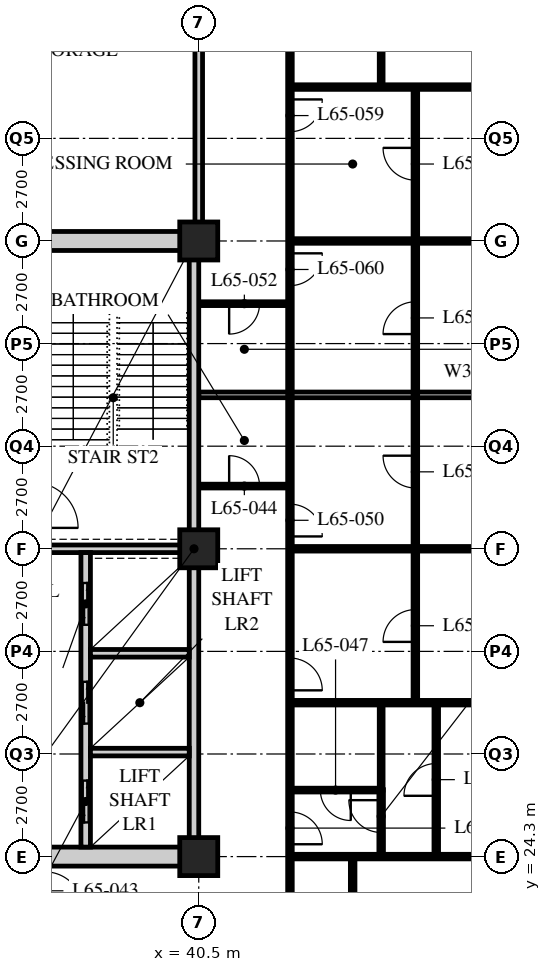
"""IFC4 building model, lengths in metres.
Left out: names, types, materials, properties, quantities, classifications, styles, units other than length and angle.
Written with IfcOpenShell. Run it as: python <this file> out.ifc"""

import sys

from ifc_helpers import new_model, si_unit, direction, frame, frame_2d, origin, origin_2d, place, context, subcontext, project, spatial, rectangle, hollow_rectangle, extrude, element, fill, save


model = new_model("IFC4")
c1 = context("Model", 3, precision=1e-05, world=origin(), true_north=direction((0.0, 1.0)))
c2 = subcontext(c1, "Body", "Model", "MODEL_VIEW")
j1 = project(units=[si_unit("LENGTHUNIT", "METRE"), si_unit("PLANEANGLEUNIT", "RADIAN")], contexts=[c1])
p1 = place(None, origin())
s1 = spatial("IfcSite", under=j1, at=p1, CompositionType="ELEMENT")
p2 = place(p1, origin())
s2 = spatial("IfcBuilding", under=s1, at=p2, CompositionType="ELEMENT")
p3 = place(p2, frame((0.0, 0.0, 254.1)))
s3 = spatial("IfcBuildingStorey", under=s2, at=p3, CompositionType="ELEMENT", Elevation=254.1)
for number, where, z_axis, x_axis in (
    (1, (40.5, 24.3, 0.0), (0.0, 0.0, 1.0), (1.0, 0.0, 0.0)),
    (2, (40.5, 32.4, 0.0), (0.0, 0.0, 1.0), (1.0, 0.0, 0.0)),
    (3, (40.5, 40.5, 0.0), (0.0, 0.0, 1.0), (1.0, 0.0, 0.0)),
):
    element("IfcColumn", number, at=place(p3, frame(where, z_axis=z_axis, x_axis=x_axis)), inside=s3, PredefinedType="COLUMN", context=c2, shape_type="SweptSolid", body=[
        extrude(hollow_rectangle(XDim=1.0, YDim=1.0, WallThickness=0.1, at=origin_2d()), origin(), (0.0, 0.0, 1.0), 3.9),
    ])
p4 = place(p3, frame((40.5, 40.5, 0.0), z_axis=(0.0, 0.0, 1.0), x_axis=(0.0, 1.0, 0.0)))
e4 = element("IfcWall", 4, at=p4, inside=s3, PredefinedType="SOLIDWALL", context=c2, shape_type="SweptSolid", body=[
    extrude(rectangle(XDim=10.35, YDim=0.2, at=frame_2d((5.175, 0.0))), origin(), (0.0, 0.0, 1.0), 3.078),
])
p5 = place(p3, frame((40.5, 34.05, 0.0), z_axis=(0.0, 0.0, 1.0), x_axis=(1.0, 0.0, 0.0)))
e5 = element("IfcWall", 5, at=p5, inside=s3, PredefinedType="PARTITIONING", context=c2, shape_type="SweptSolid", body=[
    extrude(rectangle(XDim=2.4, YDim=0.1, at=frame_2d((1.2, 0.0))), origin(), (0.0, 0.0, 1.0), 3.69),
])
p6 = place(p5, frame((0.8, 0.0, 0.0)))
e6 = element("IfcOpeningElement", 6, at=p6, cuts=e5, PredefinedType="OPENING", context=c2, shape_type="SweptSolid", body=[
    extrude(rectangle(XDim=0.8, YDim=2.1, at=frame_2d((0.4, 1.05))), frame((0.0, 0.06, 0.0), z_axis=(0.0, -1.0, 0.0), x_axis=(1.0, 0.0, 0.0)), (0.0, 0.0, 1.0), 0.12),
])
p7 = place(p3, frame((42.9, 22.5, 0.0), z_axis=(0.0, 0.0, 1.0), x_axis=(0.0, 1.0, 0.0)))
e7 = element("IfcWall", 7, at=p7, inside=s3, PredefinedType="PARTITIONING", context=c2, shape_type="SweptSolid", body=[
    extrude(rectangle(XDim=13.95, YDim=0.12, at=frame_2d((6.975, 0.0))), origin(), (0.0, 0.0, 1.0), 3.69),
])
p8 = place(p7, frame((2.125, 0.0, 0.0)))
e8 = element("IfcOpeningElement", 8, at=p8, cuts=e7, PredefinedType="OPENING", context=c2, shape_type="SweptSolid", body=[
    extrude(rectangle(XDim=0.85, YDim=2.1, at=frame_2d((0.425, 1.05))), frame((0.0, 0.07, 0.0), z_axis=(0.0, -1.0, 0.0), x_axis=(1.0, 0.0, 0.0)), (0.0, 0.0, 1.0), 0.14),
])
p9 = place(p7, frame((6.175, 0.0, 0.0)))
e9 = element("IfcOpeningElement", 9, at=p9, cuts=e7, PredefinedType="OPENING", context=c2, shape_type="SweptSolid", body=[
    extrude(rectangle(XDim=0.85, YDim=2.1, at=frame_2d((0.425, 1.05))), frame((0.0, 0.07, 0.0), z_axis=(0.0, -1.0, 0.0), x_axis=(1.0, 0.0, 0.0)), (0.0, 0.0, 1.0), 0.14),
])
p10 = place(p7, frame((10.225, 0.0, 0.0)))
e10 = element("IfcOpeningElement", 10, at=p10, cuts=e7, PredefinedType="OPENING", context=c2, shape_type="SweptSolid", body=[
    extrude(rectangle(XDim=0.85, YDim=2.1, at=frame_2d((0.425, 1.05))), frame((0.0, 0.07, 0.0), z_axis=(0.0, -1.0, 0.0), x_axis=(1.0, 0.0, 0.0)), (0.0, 0.0, 1.0), 0.14),
])
p11 = place(p3, frame((42.9, 24.3, 0.0), z_axis=(0.0, 0.0, 1.0), x_axis=(1.0, 0.0, 0.0)))
e11 = element("IfcWall", 11, at=p11, inside=s3, PredefinedType="PARTITIONING", context=c2, shape_type="SweptSolid", body=[
    extrude(rectangle(XDim=9.45, YDim=0.12, at=frame_2d((4.725, 0.0))), origin(), (0.0, 0.0, 1.0), 3.078),
])
p12 = place(p3, frame((40.5, 36.45, 0.0), z_axis=(0.0, 0.0, 1.0), x_axis=(1.0, 0.0, 0.0)))
e12 = element("IfcWall", 12, at=p12, inside=s3, PredefinedType="PARTITIONING", context=c2, shape_type="SweptSolid", body=[
    extrude(rectangle(XDim=15.9, YDim=0.15, at=frame_2d((7.95, 0.0))), origin(), (0.0, 0.0, 1.0), 3.69),
])
p13 = place(p3, frame((44.55, 16.5, 0.0), z_axis=(0.0, 0.0, 1.0), x_axis=(0.0, 1.0, 0.0)))
e13 = element("IfcWall", 13, at=p13, inside=s3, PredefinedType="PARTITIONING", context=c2, shape_type="SweptSolid", body=[
    extrude(rectangle(XDim=7.8, YDim=0.12, at=frame_2d((3.9, 0.0))), origin(), (0.0, 0.0, 1.0), 3.69),
])
p14 = place(p13, frame((3.475, 0.0, 0.0)))
e14 = element("IfcOpeningElement", 14, at=p14, cuts=e13, PredefinedType="OPENING", context=c2, shape_type="SweptSolid", body=[
    extrude(rectangle(XDim=0.85, YDim=2.1, at=frame_2d((0.425, 1.05))), frame((0.0, 0.07, 0.0), z_axis=(0.0, -1.0, 0.0), x_axis=(1.0, 0.0, 0.0)), (0.0, 0.0, 1.0), 0.14),
])
p15 = place(p3, frame((42.9, 26.05, 0.0), z_axis=(0.0, 0.0, 1.0), x_axis=(1.0, 0.0, 0.0)))
e15 = element("IfcWall", 15, at=p15, inside=s3, PredefinedType="PARTITIONING", context=c2, shape_type="SweptSolid", body=[
    extrude(rectangle(XDim=2.4, YDim=0.1, at=frame_2d((1.2, 0.0))), origin(), (0.0, 0.0, 1.0), 3.69),
])
p16 = place(p15, frame((0.8, 0.0, 0.0)))
e16 = element("IfcOpeningElement", 16, at=p16, cuts=e15, PredefinedType="OPENING", context=c2, shape_type="SweptSolid", body=[
    extrude(rectangle(XDim=0.8, YDim=2.1, at=frame_2d((0.4, 1.05))), frame((0.0, 0.06, 0.0), z_axis=(0.0, -1.0, 0.0), x_axis=(1.0, 0.0, 0.0)), (0.0, 0.0, 1.0), 0.12),
])
p17 = place(p3, frame((45.3, 26.05, 0.0), z_axis=(0.0, 0.0, 1.0), x_axis=(0.0, 1.0, 0.0)))
e17 = element("IfcWall", 17, at=p17, inside=s3, PredefinedType="PARTITIONING", context=c2, shape_type="SweptSolid", body=[
    extrude(rectangle(XDim=2.3, YDim=0.1, at=frame_2d((1.15, 0.0))), origin(), (0.0, 0.0, 1.0), 3.69),
])
p18 = place(p3, frame((42.9, 28.35, 0.0), z_axis=(0.0, 0.0, 1.0), x_axis=(1.0, 0.0, 0.0)))
e18 = element("IfcWall", 18, at=p18, inside=s3, PredefinedType="PARTITIONING", context=c2, shape_type="SweptSolid", body=[
    extrude(rectangle(XDim=13.5, YDim=0.12, at=frame_2d((6.75, 0.0))), origin(), (0.0, 0.0, 1.0), 3.69),
])
p19 = place(p3, frame((42.9, 32.4, 0.0), z_axis=(0.0, 0.0, 1.0), x_axis=(1.0, 0.0, 0.0)))
e19 = element("IfcWall", 19, at=p19, inside=s3, PredefinedType="PARTITIONING", context=c2, shape_type="SweptSolid", body=[
    extrude(rectangle(XDim=13.5, YDim=0.12, at=frame_2d((6.75, 0.0))), origin(), (0.0, 0.0, 1.0), 3.078),
])
p20 = place(p3, frame((40.5, 38.85, 0.0), z_axis=(0.0, 0.0, 1.0), x_axis=(1.0, 0.0, 0.0)))
e20 = element("IfcWall", 20, at=p20, inside=s3, PredefinedType="PARTITIONING", context=c2, shape_type="SweptSolid", body=[
    extrude(rectangle(XDim=2.4, YDim=0.1, at=frame_2d((1.2, 0.0))), origin(), (0.0, 0.0, 1.0), 3.69),
])
p21 = place(p20, frame((0.8, 0.0, 0.0)))
e21 = element("IfcOpeningElement", 21, at=p21, cuts=e20, PredefinedType="OPENING", context=c2, shape_type="SweptSolid", body=[
    extrude(rectangle(XDim=0.8, YDim=2.1, at=frame_2d((0.4, 1.05))), frame((0.0, 0.06, 0.0), z_axis=(0.0, -1.0, 0.0), x_axis=(1.0, 0.0, 0.0)), (0.0, 0.0, 1.0), 0.12),
])
p22 = place(p3, frame((42.9, 52.65, 0.0), z_axis=(0.0, 0.0, 1.0), x_axis=(0.0, -1.0, 0.0)))
e22 = element("IfcWall", 22, at=p22, inside=s3, PredefinedType="PARTITIONING", context=c2, shape_type="SweptSolid", body=[
    extrude(rectangle(XDim=16.2, YDim=0.12, at=frame_2d((8.1, 0.0))), origin(), (0.0, 0.0, 1.0), 3.69),
])
p23 = place(p22, frame((2.125, 0.0, 0.0)))
e23 = element("IfcOpeningElement", 23, at=p23, cuts=e22, PredefinedType="OPENING", context=c2, shape_type="SweptSolid", body=[
    extrude(rectangle(XDim=0.85, YDim=2.1, at=frame_2d((0.425, 1.05))), frame((0.0, 0.07, 0.0), z_axis=(0.0, -1.0, 0.0), x_axis=(1.0, 0.0, 0.0)), (0.0, 0.0, 1.0), 0.14),
])
p24 = place(p22, frame((8.425, 0.0, 0.0)))
e24 = element("IfcOpeningElement", 24, at=p24, cuts=e22, PredefinedType="OPENING", context=c2, shape_type="SweptSolid", body=[
    extrude(rectangle(XDim=0.85, YDim=2.1, at=frame_2d((0.425, 1.05))), frame((0.0, 0.07, 0.0), z_axis=(0.0, -1.0, 0.0), x_axis=(1.0, 0.0, 0.0)), (0.0, 0.0, 1.0), 0.14),
])
p25 = place(p22, frame((12.475, 0.0, 0.0)))
e25 = element("IfcOpeningElement", 25, at=p25, cuts=e22, PredefinedType="OPENING", context=c2, shape_type="SweptSolid", body=[
    extrude(rectangle(XDim=0.85, YDim=2.1, at=frame_2d((0.425, 1.05))), frame((0.0, 0.07, 0.0), z_axis=(0.0, -1.0, 0.0), x_axis=(1.0, 0.0, 0.0)), (0.0, 0.0, 1.0), 0.14),
])
p26 = place(p3, frame((45.3, 46.85, 0.0), z_axis=(0.0, 0.0, 1.0), x_axis=(0.0, -1.0, 0.0)))
e26 = element("IfcWall", 26, at=p26, inside=s3, PredefinedType="PARTITIONING", context=c2, shape_type="SweptSolid", body=[
    extrude(rectangle(XDim=2.3, YDim=0.1, at=frame_2d((1.15, 0.0))), origin(), (0.0, 0.0, 1.0), 3.69),
])
p27 = place(p3, frame((42.9, 44.55, 0.0), z_axis=(0.0, 0.0, 1.0), x_axis=(1.0, 0.0, 0.0)))
e27 = element("IfcWall", 27, at=p27, inside=s3, PredefinedType="PARTITIONING", context=c2, shape_type="SweptSolid", body=[
    extrude(rectangle(XDim=13.5, YDim=0.12, at=frame_2d((6.75, 0.0))), origin(), (0.0, 0.0, 1.0), 3.69),
])
p28 = place(p3, frame((42.9, 40.5, 0.0), z_axis=(0.0, 0.0, 1.0), x_axis=(1.0, 0.0, 0.0)))
e28 = element("IfcWall", 28, at=p28, inside=s3, PredefinedType="PARTITIONING", context=c2, shape_type="SweptSolid", body=[
    extrude(rectangle(XDim=13.5, YDim=0.12, at=frame_2d((6.75, 0.0))), origin(), (0.0, 0.0, 1.0), 3.078),
])
p29 = place(p3, frame((45.3, 24.3, 0.0), z_axis=(0.0, 0.0, 1.0), x_axis=(0.0, 1.0, 0.0)))
e29 = element("IfcWall", 29, at=p29, inside=s3, PredefinedType="PARTITIONING", context=c2, shape_type="SweptSolid", body=[
    extrude(rectangle(XDim=1.76, YDim=0.12, at=frame_2d((0.88, 0.0))), origin(), (0.0, 0.0, 1.0), 3.69),
])
p30 = place(p29, frame((0.635, 0.0, 0.0)))
e30 = element("IfcOpeningElement", 30, at=p30, cuts=e29, PredefinedType="OPENING", context=c2, shape_type="SweptSolid", body=[
    extrude(rectangle(XDim=0.85, YDim=2.1, at=frame_2d((0.425, 1.05))), frame((0.0, 0.07, 0.0), z_axis=(0.0, -1.0, 0.0), x_axis=(1.0, 0.0, 0.0)), (0.0, 0.0, 1.0), 0.14),
])
p31 = place(p3, frame((46.75, 24.3, 0.0), z_axis=(0.0, 0.0, 1.0), x_axis=(0.0, 1.0, 0.0)))
e31 = element("IfcWall", 31, at=p31, inside=s3, PredefinedType="PARTITIONING", context=c2, shape_type="SweptSolid", body=[
    extrude(rectangle(XDim=4.05, YDim=0.12, at=frame_2d((2.025, 0.0))), origin(), (0.0, 0.0, 1.0), 3.69),
])
p32 = place(p31, frame((1.6, 0.0, 0.0)))
e32 = element("IfcOpeningElement", 32, at=p32, cuts=e31, PredefinedType="OPENING", context=c2, shape_type="SweptSolid", body=[
    extrude(rectangle(XDim=0.85, YDim=2.1, at=frame_2d((0.425, 1.05))), frame((0.0, 0.07, 0.0), z_axis=(0.0, -1.0, 0.0), x_axis=(1.0, 0.0, 0.0)), (0.0, 0.0, 1.0), 0.14),
])
p33 = place(p3, frame((46.2, 28.35, 0.0), z_axis=(0.0, 0.0, 1.0), x_axis=(0.0, 1.0, 0.0)))
e33 = element("IfcWall", 33, at=p33, inside=s3, PredefinedType="PARTITIONING", context=c2, shape_type="SweptSolid", body=[
    extrude(rectangle(XDim=16.2, YDim=0.12, at=frame_2d((8.1, 0.0))), origin(), (0.0, 0.0, 1.0), 3.69),
])
p34 = place(p33, frame((1.6, 0.0, 0.0)))
e34 = element("IfcOpeningElement", 34, at=p34, cuts=e33, PredefinedType="OPENING", context=c2, shape_type="SweptSolid", body=[
    extrude(rectangle(XDim=0.85, YDim=2.1, at=frame_2d((0.425, 1.05))), frame((0.0, 0.07, 0.0), z_axis=(0.0, -1.0, 0.0), x_axis=(1.0, 0.0, 0.0)), (0.0, 0.0, 1.0), 0.14),
])
p35 = place(p33, frame((5.65, 0.0, 0.0)))
e35 = element("IfcOpeningElement", 35, at=p35, cuts=e33, PredefinedType="OPENING", context=c2, shape_type="SweptSolid", body=[
    extrude(rectangle(XDim=0.85, YDim=2.1, at=frame_2d((0.425, 1.05))), frame((0.0, 0.07, 0.0), z_axis=(0.0, -1.0, 0.0), x_axis=(1.0, 0.0, 0.0)), (0.0, 0.0, 1.0), 0.14),
])
p36 = place(p33, frame((13.75, 0.0, 0.0)))
e36 = element("IfcOpeningElement", 36, at=p36, cuts=e33, PredefinedType="OPENING", context=c2, shape_type="SweptSolid", body=[
    extrude(rectangle(XDim=0.85, YDim=2.1, at=frame_2d((0.425, 1.05))), frame((0.0, 0.07, 0.0), z_axis=(0.0, -1.0, 0.0), x_axis=(1.0, 0.0, 0.0)), (0.0, 0.0, 1.0), 0.14),
])
p37 = place(p33, frame((9.7, 0.0, 0.0)))
e37 = element("IfcOpeningElement", 37, at=p37, cuts=e33, PredefinedType="OPENING", context=c2, shape_type="SweptSolid", body=[
    extrude(rectangle(XDim=0.85, YDim=2.1, at=frame_2d((0.425, 1.05))), frame((0.0, 0.07, 0.0), z_axis=(0.0, -1.0, 0.0), x_axis=(1.0, 0.0, 0.0)), (0.0, 0.0, 1.0), 0.14),
])
p38 = place(p3, frame((15.95, 24.3, 0.0), z_axis=(0.0, 0.0, 1.0), x_axis=(1.0, 0.0, 0.0)))
e38 = element("IfcWall", 38, at=p38, inside=s3, PredefinedType="SOLIDWALL", context=c2, shape_type="SweptSolid", body=[
    extrude(rectangle(XDim=24.55, YDim=0.5, at=frame_2d((12.275, 0.0))), origin(), (0.0, 0.0, 1.0), 3.04),
])
p39 = place(p38, frame((11.5, 0.0, 0.0)))
e39 = element("IfcOpeningElement", 39, at=p39, cuts=e38, PredefinedType="OPENING", context=c2, shape_type="SweptSolid", body=[
    extrude(rectangle(XDim=1.8, YDim=2.4, at=frame_2d((0.9, 1.2))), frame((0.0, 0.26, 0.0), z_axis=(0.0, -1.0, 0.0), x_axis=(1.0, 0.0, 0.0)), (0.0, 0.0, 1.0), 0.52),
])
p40 = place(p3, frame((15.95, 40.5, 0.0), z_axis=(0.0, 0.0, 1.0), x_axis=(1.0, 0.0, 0.0)))
e40 = element("IfcWall", 40, at=p40, inside=s3, PredefinedType="SOLIDWALL", context=c2, shape_type="SweptSolid", body=[
    extrude(rectangle(XDim=24.55, YDim=0.5, at=frame_2d((12.275, 0.0))), origin(), (0.0, 0.0, 1.0), 3.04),
])
p41 = place(p40, frame((11.5, 0.0, 0.0)))
e41 = element("IfcOpeningElement", 41, at=p41, cuts=e40, PredefinedType="OPENING", context=c2, shape_type="SweptSolid", body=[
    extrude(rectangle(XDim=1.8, YDim=2.4, at=frame_2d((0.9, 1.2))), frame((0.0, 0.26, 0.0), z_axis=(0.0, -1.0, 0.0), x_axis=(1.0, 0.0, 0.0)), (0.0, 0.0, 1.0), 0.52),
])
p42 = place(p3, frame((40.375, 24.55, 0.0), z_axis=(0.0, 0.0, 1.0), x_axis=(0.0, 1.0, 0.0)))
e42 = element("IfcWall", 42, at=p42, inside=s3, PredefinedType="SOLIDWALL", context=c2, shape_type="SweptSolid", body=[
    extrude(rectangle(XDim=15.7, YDim=0.25, at=frame_2d((7.85, 0.0))), origin(), (0.0, 0.0, 1.0), 3.078),
])
p43 = place(p3, frame((32.3, 32.4, 0.0), z_axis=(0.0, 0.0, 1.0), x_axis=(1.0, 0.0, 0.0)))
e43 = element("IfcWall", 43, at=p43, inside=s3, PredefinedType="SOLIDWALL", context=c2, shape_type="SweptSolid", body=[
    extrude(rectangle(XDim=7.95, YDim=0.2, at=frame_2d((3.975, 0.0))), origin(), (0.0, 0.0, 1.0), 3.078),
])
p44 = place(p3, frame((37.525, 24.55, 0.0), z_axis=(0.0, 0.0, 1.0), x_axis=(0.0, 1.0, 0.0)))
e44 = element("IfcWall", 44, at=p44, inside=s3, PredefinedType="SOLIDWALL", context=c2, shape_type="SweptSolid", body=[
    extrude(rectangle(XDim=7.75, YDim=0.25, at=frame_2d((3.875, 0.0))), origin(), (0.0, 0.0, 1.0), 3.69),
])
p45 = place(p44, frame((0.65, 0.0, 0.0)))
e45 = element("IfcOpeningElement", 45, at=p45, cuts=e44, PredefinedType="OPENING", context=c2, shape_type="SweptSolid", body=[
    extrude(rectangle(XDim=1.1, YDim=2.4, at=frame_2d((0.55, 1.2))), frame((0.0, 0.135, 0.0), z_axis=(0.0, -1.0, 0.0), x_axis=(1.0, 0.0, 0.0)), (0.0, 0.0, 1.0), 0.27),
])
p46 = place(p44, frame((3.25, 0.0, 0.0)))
e46 = element("IfcOpeningElement", 46, at=p46, cuts=e44, PredefinedType="OPENING", context=c2, shape_type="SweptSolid", body=[
    extrude(rectangle(XDim=1.1, YDim=2.4, at=frame_2d((0.55, 1.2))), frame((0.0, 0.135, 0.0), z_axis=(0.0, -1.0, 0.0), x_axis=(1.0, 0.0, 0.0)), (0.0, 0.0, 1.0), 0.27),
])
p47 = place(p44, frame((5.85, 0.0, 0.0)))
e47 = element("IfcOpeningElement", 47, at=p47, cuts=e44, PredefinedType="OPENING", context=c2, shape_type="SweptSolid", body=[
    extrude(rectangle(XDim=1.1, YDim=2.4, at=frame_2d((0.55, 1.2))), frame((0.0, 0.135, 0.0), z_axis=(0.0, -1.0, 0.0), x_axis=(1.0, 0.0, 0.0)), (0.0, 0.0, 1.0), 0.27),
])
for number, where, z_axis, x_axis in (
    (48, (37.65, 27.05, 0.0), (0.0, 0.0, 1.0), (1.0, 0.0, 0.0)),
    (49, (37.65, 29.65, 0.0), (0.0, 0.0, 1.0), (1.0, 0.0, 0.0)),
):
    element("IfcWall", number, at=place(p3, frame(where, z_axis=z_axis, x_axis=x_axis)), inside=s3, PredefinedType="SOLIDWALL", context=c2, shape_type="SweptSolid", body=[
        extrude(rectangle(XDim=2.6, YDim=0.2, at=frame_2d((1.3, 0.0))), origin(), (0.0, 0.0, 1.0), 3.69),
    ])
p48 = place(p6, origin())
e50 = element("IfcDoor", 50, at=p48, inside=s3, OperationType="SINGLE_SWING_LEFT", PredefinedType="DOOR", context=c2, shape_type="SweptSolid", body=[
    extrude(rectangle(XDim=0.8, YDim=2.1, at=frame_2d((0.4, 1.05))), frame((0.0, 0.025, 0.0), z_axis=(0.0, -1.0, 0.0), x_axis=(1.0, 0.0, 0.0)), (0.0, 0.0, 1.0), 0.05),
])
fill(e6, e50)
p49 = place(p16, origin())
e51 = element("IfcDoor", 51, at=p49, inside=s3, OperationType="SINGLE_SWING_LEFT", PredefinedType="DOOR", context=c2, shape_type="SweptSolid", body=[
    extrude(rectangle(XDim=0.8, YDim=2.1, at=frame_2d((0.4, 1.05))), frame((0.0, 0.025, 0.0), z_axis=(0.0, -1.0, 0.0), x_axis=(1.0, 0.0, 0.0)), (0.0, 0.0, 1.0), 0.05),
])
fill(e16, e51)
p50 = place(p8, origin())
e52 = element("IfcDoor", 52, at=p50, inside=s3, OperationType="SINGLE_SWING_RIGHT", PredefinedType="DOOR", context=c2, shape_type="SweptSolid", body=[
    extrude(rectangle(XDim=0.85, YDim=2.1, at=frame_2d((0.425, 1.05))), frame((0.0, 0.025, 0.0), z_axis=(0.0, -1.0, 0.0), x_axis=(1.0, 0.0, 0.0)), (0.0, 0.0, 1.0), 0.05),
])
fill(e8, e52)
p51 = place(p9, origin())
e53 = element("IfcDoor", 53, at=p51, inside=s3, OperationType="SINGLE_SWING_RIGHT", PredefinedType="DOOR", context=c2, shape_type="SweptSolid", body=[
    extrude(rectangle(XDim=0.85, YDim=2.1, at=frame_2d((0.425, 1.05))), frame((0.0, 0.025, 0.0), z_axis=(0.0, -1.0, 0.0), x_axis=(1.0, 0.0, 0.0)), (0.0, 0.0, 1.0), 0.05),
])
fill(e9, e53)
p52 = place(p10, origin())
e54 = element("IfcDoor", 54, at=p52, inside=s3, OperationType="SINGLE_SWING_RIGHT", PredefinedType="DOOR", context=c2, shape_type="SweptSolid", body=[
    extrude(rectangle(XDim=0.85, YDim=2.1, at=frame_2d((0.425, 1.05))), frame((0.0, 0.025, 0.0), z_axis=(0.0, -1.0, 0.0), x_axis=(1.0, 0.0, 0.0)), (0.0, 0.0, 1.0), 0.05),
])
fill(e10, e54)
p53 = place(p21, origin())
e55 = element("IfcDoor", 55, at=p53, inside=s3, OperationType="SINGLE_SWING_RIGHT", PredefinedType="DOOR", context=c2, shape_type="SweptSolid", body=[
    extrude(rectangle(XDim=0.8, YDim=2.1, at=frame_2d((0.4, 1.05))), frame((0.0, 0.025, 0.0), z_axis=(0.0, -1.0, 0.0), x_axis=(1.0, 0.0, 0.0)), (0.0, 0.0, 1.0), 0.05),
])
fill(e21, e55)
p54 = place(p24, origin())
e56 = element("IfcDoor", 56, at=p54, inside=s3, OperationType="SINGLE_SWING_LEFT", PredefinedType="DOOR", context=c2, shape_type="SweptSolid", body=[
    extrude(rectangle(XDim=0.85, YDim=2.1, at=frame_2d((0.425, 1.05))), frame((0.0, 0.025, 0.0), z_axis=(0.0, -1.0, 0.0), x_axis=(1.0, 0.0, 0.0)), (0.0, 0.0, 1.0), 0.05),
])
fill(e24, e56)
p55 = place(p25, origin())
e57 = element("IfcDoor", 57, at=p55, inside=s3, OperationType="SINGLE_SWING_LEFT", PredefinedType="DOOR", context=c2, shape_type="SweptSolid", body=[
    extrude(rectangle(XDim=0.85, YDim=2.1, at=frame_2d((0.425, 1.05))), frame((0.0, 0.025, 0.0), z_axis=(0.0, -1.0, 0.0), x_axis=(1.0, 0.0, 0.0)), (0.0, 0.0, 1.0), 0.05),
])
fill(e25, e57)
p56 = place(p30, origin())
e58 = element("IfcDoor", 58, at=p56, inside=s3, OperationType="SINGLE_SWING_RIGHT", PredefinedType="DOOR", context=c2, shape_type="SweptSolid", body=[
    extrude(rectangle(XDim=0.85, YDim=2.1, at=frame_2d((0.425, 1.05))), frame((0.0, 0.025, 0.0), z_axis=(0.0, -1.0, 0.0), x_axis=(1.0, 0.0, 0.0)), (0.0, 0.0, 1.0), 0.05),
])
fill(e30, e58)
p57 = place(p32, origin())
e59 = element("IfcDoor", 59, at=p57, inside=s3, OperationType="SINGLE_SWING_LEFT", PredefinedType="DOOR", context=c2, shape_type="SweptSolid", body=[
    extrude(rectangle(XDim=0.85, YDim=2.1, at=frame_2d((0.425, 1.05))), frame((0.0, 0.025, 0.0), z_axis=(0.0, -1.0, 0.0), x_axis=(1.0, 0.0, 0.0)), (0.0, 0.0, 1.0), 0.05),
])
fill(e32, e59)
p58 = place(p34, origin())
e60 = element("IfcDoor", 60, at=p58, inside=s3, OperationType="SINGLE_SWING_LEFT", PredefinedType="DOOR", context=c2, shape_type="SweptSolid", body=[
    extrude(rectangle(XDim=0.85, YDim=2.1, at=frame_2d((0.425, 1.05))), frame((0.0, 0.025, 0.0), z_axis=(0.0, -1.0, 0.0), x_axis=(1.0, 0.0, 0.0)), (0.0, 0.0, 1.0), 0.05),
])
fill(e34, e60)
p59 = place(p35, origin())
e61 = element("IfcDoor", 61, at=p59, inside=s3, OperationType="SINGLE_SWING_RIGHT", PredefinedType="DOOR", context=c2, shape_type="SweptSolid", body=[
    extrude(rectangle(XDim=0.85, YDim=2.1, at=frame_2d((0.425, 1.05))), frame((0.0, 0.025, 0.0), z_axis=(0.0, -1.0, 0.0), x_axis=(1.0, 0.0, 0.0)), (0.0, 0.0, 1.0), 0.05),
])
fill(e35, e61)
p60 = place(p36, origin())
e62 = element("IfcDoor", 62, at=p60, inside=s3, OperationType="SINGLE_SWING_RIGHT", PredefinedType="DOOR", context=c2, shape_type="SweptSolid", body=[
    extrude(rectangle(XDim=0.85, YDim=2.1, at=frame_2d((0.425, 1.05))), frame((0.0, 0.025, 0.0), z_axis=(0.0, -1.0, 0.0), x_axis=(1.0, 0.0, 0.0)), (0.0, 0.0, 1.0), 0.05),
])
fill(e36, e62)
p61 = place(p37, origin())
e63 = element("IfcDoor", 63, at=p61, inside=s3, OperationType="SINGLE_SWING_LEFT", PredefinedType="DOOR", context=c2, shape_type="SweptSolid", body=[
    extrude(rectangle(XDim=0.85, YDim=2.1, at=frame_2d((0.425, 1.05))), frame((0.0, 0.025, 0.0), z_axis=(0.0, -1.0, 0.0), x_axis=(1.0, 0.0, 0.0)), (0.0, 0.0, 1.0), 0.05),
])
fill(e37, e63)
p62 = place(p45, origin())
e64 = element("IfcDoor", 64, at=p62, inside=s3, OperationType="DOUBLE_DOOR_SLIDING", PredefinedType="DOOR", context=c2, shape_type="SweptSolid", body=[
    extrude(rectangle(XDim=1.1, YDim=2.4, at=frame_2d((0.55, 1.2))), frame((0.0, 0.025, 0.0), z_axis=(0.0, -1.0, 0.0), x_axis=(1.0, 0.0, 0.0)), (0.0, 0.0, 1.0), 0.05),
])
fill(e45, e64)
p63 = place(p46, origin())
e65 = element("IfcDoor", 65, at=p63, inside=s3, OperationType="DOUBLE_DOOR_SLIDING", PredefinedType="DOOR", context=c2, shape_type="SweptSolid", body=[
    extrude(rectangle(XDim=1.1, YDim=2.4, at=frame_2d((0.55, 1.2))), frame((0.0, 0.025, 0.0), z_axis=(0.0, -1.0, 0.0), x_axis=(1.0, 0.0, 0.0)), (0.0, 0.0, 1.0), 0.05),
])
fill(e46, e65)
p64 = place(p47, origin())
e66 = element("IfcDoor", 66, at=p64, inside=s3, OperationType="DOUBLE_DOOR_SLIDING", PredefinedType="DOOR", context=c2, shape_type="SweptSolid", body=[
    extrude(rectangle(XDim=1.1, YDim=2.4, at=frame_2d((0.55, 1.2))), frame((0.0, 0.025, 0.0), z_axis=(0.0, -1.0, 0.0), x_axis=(1.0, 0.0, 0.0)), (0.0, 0.0, 1.0), 0.05),
])
fill(e47, e66)
save(model, sys.argv[1])
